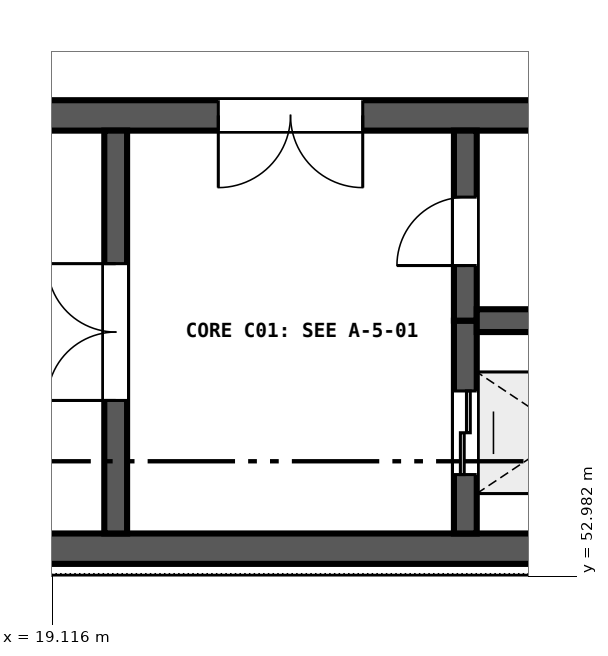
"""IFC4 building model, lengths in metres.
Left out: names, types, materials, properties, quantities, classifications, styles, units other than length and angle.
Written with IfcOpenShell. Run it as: python <this file> out.ifc"""

import sys

from ifc_helpers import new_model, si_unit, direction, frame, frame_2d, origin, place, context, subcontext, project, spatial, rectangle, extrude, element, fill, save


model = new_model("IFC4")
c1 = context("Model", 3, precision=1e-05, world=origin(), true_north=direction((0.0, 1.0)))
c2 = subcontext(c1, "Body", "Model", "MODEL_VIEW")
j1 = project(units=[si_unit("LENGTHUNIT", "METRE"), si_unit("PLANEANGLEUNIT", "RADIAN")], contexts=[c1])
p1 = place(None, origin())
s1 = spatial("IfcSite", under=j1, at=p1, CompositionType="ELEMENT")
p2 = place(p1, origin())
s2 = spatial("IfcBuilding", under=s1, at=p2, CompositionType="ELEMENT")
p3 = place(p2, origin())
s3 = spatial("IfcBuildingStorey", under=s2, at=p3, CompositionType="ELEMENT", Elevation=0.0)
p4 = place(p3, frame((9.9, 53.35, 0.0), z_axis=(0.0, 0.0, 1.0), x_axis=(1.0, 0.0, 0.0)))
e1 = element("IfcWall", 1, at=p4, inside=s3, PredefinedType="SHEAR", context=c2, shape_type="SweptSolid", body=[
    extrude(rectangle(XDim=18.0, YDim=0.4, at=frame_2d((9.0, 0.0))), origin(), (0.0, 0.0, 1.0), 4.5),
])
p5 = place(p3, frame((27.9, 59.05, 0.0), z_axis=(0.0, 0.0, 1.0), x_axis=(-1.0, 0.0, 0.0)))
e2 = element("IfcWall", 2, at=p5, inside=s3, PredefinedType="SHEAR", context=c2, shape_type="SweptSolid", body=[
    extrude(rectangle(XDim=18.0, YDim=0.4, at=frame_2d((9.0, 0.0))), origin(), (0.0, 0.0, 1.0), 4.5),
])
p6 = place(p5, frame((4.7, 0.0, 0.0)))
e3 = element("IfcOpeningElement", 3, at=p6, cuts=e2, PredefinedType="OPENING", context=c2, shape_type="SweptSolid", body=[
    extrude(rectangle(XDim=1.9, YDim=2.25, at=frame_2d((0.95, 1.125))), frame((0.0, 0.21, 0.0), z_axis=(0.0, -1.0, 0.0), x_axis=(1.0, 0.0, 0.0)), (0.0, 0.0, 1.0), 0.42),
])
p7 = place(p3, frame((19.95, 53.55, 0.0), z_axis=(0.0, 0.0, 1.0), x_axis=(0.0, 1.0, 0.0)))
e4 = element("IfcWall", 4, at=p7, inside=s3, PredefinedType="SHEAR", context=c2, shape_type="SweptSolid", body=[
    extrude(rectangle(XDim=5.3, YDim=0.3, at=frame_2d((2.65, 0.0))), origin(), (0.0, 0.0, 1.0), 4.5),
])
p8 = place(p7, frame((1.75, 0.0, 0.0)))
e5 = element("IfcOpeningElement", 5, at=p8, cuts=e4, PredefinedType="OPENING", context=c2, shape_type="SweptSolid", body=[
    extrude(rectangle(XDim=1.8, YDim=2.25, at=frame_2d((0.9, 1.125))), frame((0.0, 0.16, 0.0), z_axis=(0.0, -1.0, 0.0), x_axis=(1.0, 0.0, 0.0)), (0.0, 0.0, 1.0), 0.32),
])
p9 = place(p3, frame((24.55, 53.55, 0.0), z_axis=(0.0, 0.0, 1.0), x_axis=(0.0, 1.0, 0.0)))
e6 = element("IfcWall", 6, at=p9, inside=s3, PredefinedType="SHEAR", context=c2, shape_type="SweptSolid", body=[
    extrude(rectangle(XDim=2.8, YDim=0.3, at=frame_2d((1.4, 0.0))), origin(), (0.0, 0.0, 1.0), 4.5),
])
p10 = place(p9, frame((0.775, 0.0, 0.0)))
e7 = element("IfcOpeningElement", 7, at=p10, cuts=e6, PredefinedType="OPENING", context=c2, shape_type="SweptSolid", body=[
    extrude(rectangle(XDim=1.1, YDim=2.1, at=frame_2d((0.55, 1.05))), frame((0.0, 0.16, 0.0), z_axis=(0.0, -1.0, 0.0), x_axis=(1.0, 0.0, 0.0)), (0.0, 0.0, 1.0), 0.32),
])
p11 = place(p3, frame((24.55, 56.35, 0.0), z_axis=(0.0, 0.0, 1.0), x_axis=(0.0, 1.0, 0.0)))
e8 = element("IfcWall", 8, at=p11, inside=s3, PredefinedType="SHEAR", context=c2, shape_type="SweptSolid", body=[
    extrude(rectangle(XDim=2.5, YDim=0.3, at=frame_2d((1.25, 0.0))), origin(), (0.0, 0.0, 1.0), 4.5),
])
p12 = place(p11, frame((0.725, 0.0, 0.0)))
e9 = element("IfcOpeningElement", 9, at=p12, cuts=e8, PredefinedType="OPENING", context=c2, shape_type="SweptSolid", body=[
    extrude(rectangle(XDim=0.9, YDim=2.1, at=frame_2d((0.45, 1.05))), frame((0.0, 0.16, 0.0), z_axis=(0.0, -1.0, 0.0), x_axis=(1.0, 0.0, 0.0)), (0.0, 0.0, 1.0), 0.32),
])
p13 = place(p3, frame((24.7, 56.35, 0.0), z_axis=(0.0, 0.0, 1.0), x_axis=(1.0, 0.0, 0.0)))
e10 = element("IfcWall", 10, at=p13, inside=s3, PredefinedType="SHEAR", context=c2, shape_type="SweptSolid", body=[
    extrude(rectangle(XDim=2.85, YDim=0.3, at=frame_2d((1.425, 0.0))), origin(), (0.0, 0.0, 1.0), 4.5),
])
p14 = place(p8, origin())
e11 = element("IfcDoor", 11, at=p14, inside=s3, OperationType="DOUBLE_DOOR_SINGLE_SWING", PredefinedType="DOOR", context=c2, shape_type="SweptSolid", body=[
    extrude(rectangle(XDim=1.8, YDim=2.25, at=frame_2d((0.9, 1.125))), frame((0.0, 0.025, 0.0), z_axis=(0.0, -1.0, 0.0), x_axis=(1.0, 0.0, 0.0)), (0.0, 0.0, 1.0), 0.05),
])
fill(e5, e11)
p15 = place(p12, origin())
e12 = element("IfcDoor", 12, at=p15, inside=s3, OperationType="SINGLE_SWING_LEFT", PredefinedType="DOOR", context=c2, shape_type="SweptSolid", body=[
    extrude(rectangle(XDim=0.9, YDim=2.1, at=frame_2d((0.45, 1.05))), frame((0.0, 0.025, 0.0), z_axis=(0.0, -1.0, 0.0), x_axis=(1.0, 0.0, 0.0)), (0.0, 0.0, 1.0), 0.05),
])
fill(e9, e12)
p16 = place(p10, origin())
e13 = element("IfcDoor", 13, at=p16, inside=s3, OperationType="DOUBLE_DOOR_SLIDING", PredefinedType="DOOR", context=c2, shape_type="SweptSolid", body=[
    extrude(rectangle(XDim=1.1, YDim=2.1, at=frame_2d((0.55, 1.05))), frame((0.0, 0.025, 0.0), z_axis=(0.0, -1.0, 0.0), x_axis=(1.0, 0.0, 0.0)), (0.0, 0.0, 1.0), 0.05),
])
fill(e7, e13)
p17 = place(p6, origin())
e14 = element("IfcDoor", 14, at=p17, inside=s3, OperationType="DOUBLE_DOOR_SINGLE_SWING", PredefinedType="DOOR", context=c2, shape_type="SweptSolid", body=[
    extrude(rectangle(XDim=1.9, YDim=2.25, at=frame_2d((0.95, 1.125))), frame((0.0, 0.025, 0.0), z_axis=(0.0, -1.0, 0.0), x_axis=(1.0, 0.0, 0.0)), (0.0, 0.0, 1.0), 0.05),
])
fill(e3, e14)
save(model, sys.argv[1])
